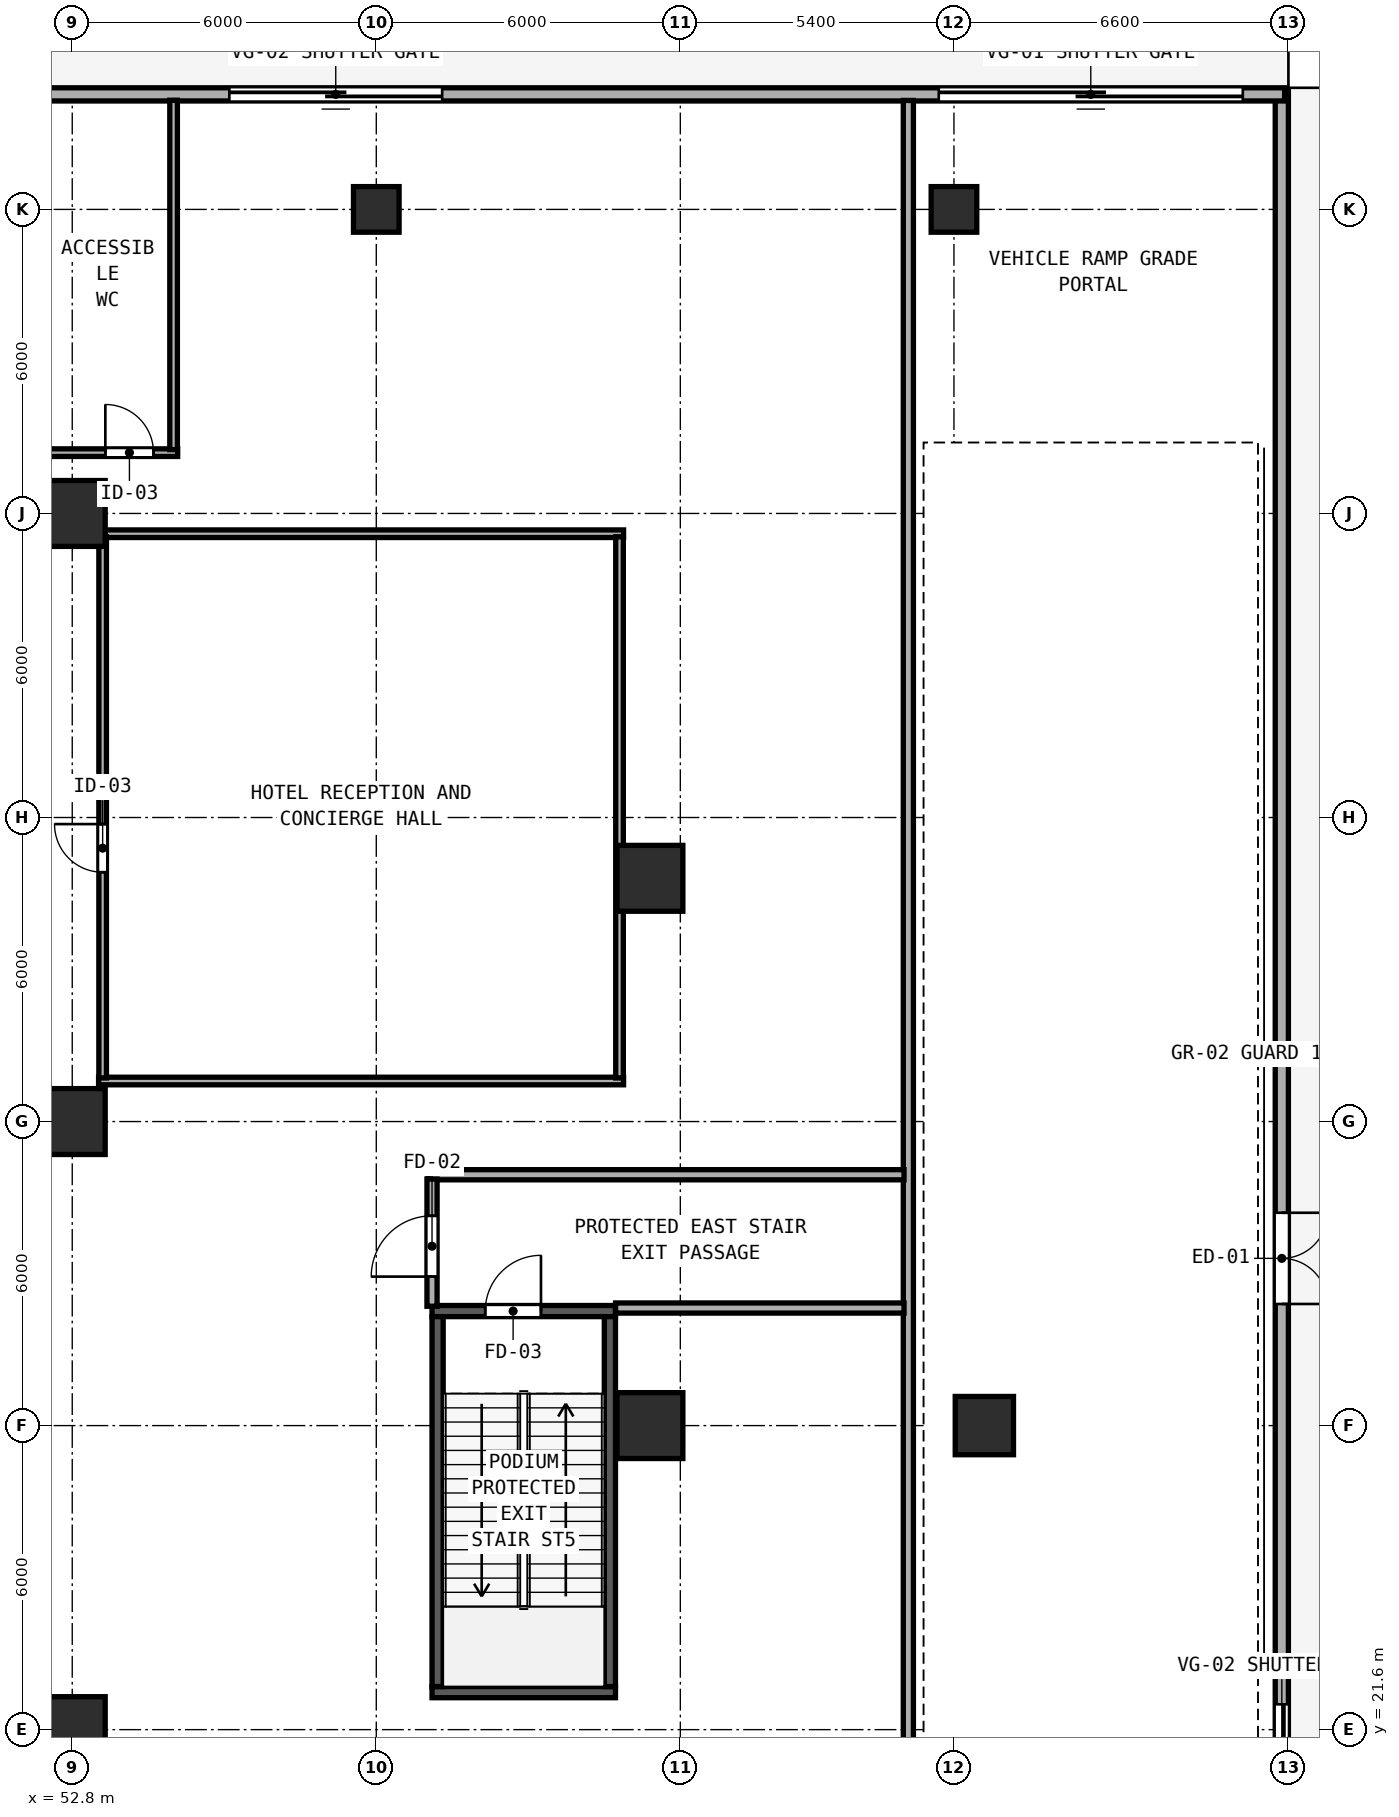
"""IFC4 building model, lengths in metres.
Left out: names, types, materials, properties, quantities, classifications, styles, units other than length and angle.
Written with IfcOpenShell. Run it as: python <this file> out.ifc"""

import sys

from ifc_helpers import new_model, si_unit, direction, frame, frame_2d, origin, origin_2d, place, context, subcontext, project, spatial, rectangle, hollow_rectangle, extrude, element, fill, save


model = new_model("IFC4")
c1 = context("Model", 3, precision=1e-05, world=origin(), true_north=direction((0.0, 1.0)))
c2 = subcontext(c1, "Body", "Model", "MODEL_VIEW")
j1 = project(units=[si_unit("LENGTHUNIT", "METRE"), si_unit("PLANEANGLEUNIT", "RADIAN")], contexts=[c1])
p1 = place(None, origin())
s1 = spatial("IfcSite", under=j1, at=p1, CompositionType="ELEMENT")
p2 = place(p1, origin())
s2 = spatial("IfcBuilding", under=s1, at=p2, CompositionType="ELEMENT")
p3 = place(p2, origin())
s3 = spatial("IfcBuildingStorey", under=s2, at=p3, CompositionType="ELEMENT", Elevation=0.0)
p4 = place(p3, frame((59.9, 29.86, 0.0), z_axis=(0.0, 0.0, 1.0), x_axis=(1.0, 0.0, 0.0)))
e1 = element("IfcWall", 1, at=p4, inside=s3, PredefinedType="SHEAR", context=c2, shape_type="SweptSolid", body=[
    extrude(rectangle(XDim=3.62, YDim=0.22, at=frame_2d((1.81, 0.0))), origin(), (0.0, 0.0, 1.0), 5.16),
])
p5 = place(p4, frame((1.05, 0.0, 0.0)))
e2 = element("IfcOpeningElement", 2, at=p5, cuts=e1, PredefinedType="OPENING", context=c2, shape_type="SweptSolid", body=[
    extrude(rectangle(XDim=1.1, YDim=2.15, at=frame_2d((0.55, 1.075))), frame((0.0, 0.12, 0.0), z_axis=(0.0, -1.0, 0.0), x_axis=(1.0, 0.0, 0.0)), (0.0, 0.0, 1.0), 0.24),
])
p6 = place(p3, frame((59.9, 22.34, 0.0), z_axis=(0.0, 0.0, 1.0), x_axis=(1.0, 0.0, 0.0)))
e3 = element("IfcWall", 3, at=p6, inside=s3, PredefinedType="SHEAR", context=c2, shape_type="SweptSolid", body=[
    extrude(rectangle(XDim=3.62, YDim=0.22, at=frame_2d((1.81, 0.0))), origin(), (0.0, 0.0, 1.0), 5.16),
])
for number, where, z_axis, x_axis in (
    (4, (60.01, 22.45, 0.0), (0.0, 0.0, 1.0), (0.0, 1.0, 0.0)),
    (5, (63.41, 22.45, 0.0), (0.0, 0.0, 1.0), (0.0, 1.0, 0.0)),
):
    element("IfcWall", number, at=place(p3, frame(where, z_axis=z_axis, x_axis=x_axis)), inside=s3, PredefinedType="SHEAR", context=c2, shape_type="SweptSolid", body=[
        extrude(rectangle(XDim=7.3, YDim=0.22, at=frame_2d((3.65, 0.0))), origin(), (0.0, 0.0, 1.0), 5.16),
    ])
for number, where, z_axis, x_axis in (
    (6, (52.8, 21.6, 0.0), (0.0, 0.0, 1.0), (1.0, 0.0, 0.0)),
    (7, (52.8, 33.6, 0.0), (0.0, 0.0, 1.0), (1.0, 0.0, 0.0)),
    (8, (52.8, 45.6, 0.0), (0.0, 0.0, 1.0), (1.0, 0.0, 0.0)),
    (9, (64.2, 27.6, 0.0), (0.0, 0.0, 1.0), (1.0, 0.0, 0.0)),
    (10, (64.2, 38.4, 0.0), (0.0, 0.0, 1.0), (1.0, 0.0, 0.0)),
):
    element("IfcColumn", number, at=place(p3, frame(where, z_axis=z_axis, x_axis=x_axis)), inside=s3, PredefinedType="COLUMN", context=c2, shape_type="SweptSolid", body=[
        extrude(hollow_rectangle(XDim=1.3, YDim=1.3, WallThickness=0.048, at=origin_2d()), origin(), (0.0, 0.0, 1.0), 5.4),
    ])
p7 = place(p3, frame((70.8, 27.6, 0.0), z_axis=(0.0, 0.0, 1.0), x_axis=(1.0, 0.0, 0.0)))
e11 = element("IfcColumn", 11, at=p7, inside=s3, PredefinedType="COLUMN", context=c2, shape_type="SweptSolid", body=[
    extrude(hollow_rectangle(XDim=1.15, YDim=1.15, WallThickness=0.042, at=origin_2d()), origin(), (0.0, 0.0, 1.0), 5.4),
])
for number, where, z_axis, x_axis in (
    (12, (58.8, 51.6, 0.0), (0.0, 0.0, 1.0), (1.0, 0.0, 0.0)),
    (13, (70.2, 51.6, 0.0), (0.0, 0.0, 1.0), (1.0, 0.0, 0.0)),
):
    element("IfcColumn", number, at=place(p3, frame(where, z_axis=z_axis, x_axis=x_axis)), inside=s3, PredefinedType="COLUMN", context=c2, shape_type="SweptSolid", body=[
        extrude(rectangle(XDim=0.9, YDim=0.9, at=origin_2d()), origin(), (0.0, 0.0, 1.0), 5.4),
    ])
p8 = place(p3, frame((76.67, 2.399, 0.0), z_axis=(0.0, 0.0, 1.0), x_axis=(0.0, 1.0, 0.0)))
e14 = element("IfcWall", 14, at=p8, inside=s3, PredefinedType="SOLIDWALL", context=c2, shape_type="SweptSolid", body=[
    extrude(rectangle(XDim=51.526, YDim=0.26, at=frame_2d((25.763, 0.0))), origin(), (0.0, 0.0, 1.0), 5.16),
])
p9 = place(p8, frame((29.401, 0.0, 0.0), z_axis=(0.0, 0.0, 1.0), x_axis=(-1.0, 0.0, 0.0)))
e15 = element("IfcOpeningElement", 15, at=p9, cuts=e14, PredefinedType="OPENING", context=c2, shape_type="SweptSolid", body=[
    extrude(rectangle(XDim=1.8, YDim=2.35, at=frame_2d((0.9, 1.175))), frame((0.0, 0.14, 0.0), z_axis=(0.0, -1.0, 0.0), x_axis=(1.0, 0.0, 0.0)), (0.0, 0.0, 1.0), 0.28),
])
p10 = place(p8, frame((19.701, 0.0, 0.0), z_axis=(0.0, 0.0, 1.0), x_axis=(-1.0, 0.0, 0.0)))
e16 = element("IfcOpeningElement", 16, at=p10, cuts=e14, PredefinedType="OPENING", context=c2, shape_type="SweptSolid", body=[
    extrude(rectangle(XDim=4.2, YDim=3.3, at=frame_2d((2.1, 1.65))), frame((0.0, 0.14, 0.0), z_axis=(0.0, -1.0, 0.0), x_axis=(1.0, 0.0, 0.0)), (0.0, 0.0, 1.0), 0.28),
])
p11 = place(p3, frame((76.725, 53.87, 0.0), z_axis=(0.0, 0.0, 1.0), x_axis=(-1.0, 0.0, 0.0)))
e17 = element("IfcWall", 17, at=p11, inside=s3, PredefinedType="SOLIDWALL", context=c2, shape_type="SweptSolid", body=[
    extrude(rectangle(XDim=76.65, YDim=0.26, at=frame_2d((38.325, 0.0))), origin(), (0.0, 0.0, 1.0), 5.16),
])
p12 = place(p11, frame((42.425, 0.0, 0.0), z_axis=(0.0, 0.0, 1.0), x_axis=(-1.0, 0.0, 0.0)))
e18 = element("IfcOpeningElement", 18, at=p12, cuts=e17, PredefinedType="OPENING", context=c2, shape_type="SweptSolid", body=[
    extrude(rectangle(XDim=1.8, YDim=2.35, at=frame_2d((0.9, 1.175))), frame((0.0, 0.14, 0.0), z_axis=(0.0, -1.0, 0.0), x_axis=(1.0, 0.0, 0.0)), (0.0, 0.0, 1.0), 0.28),
])
p13 = place(p11, frame((36.025, 0.0, 0.0), z_axis=(0.0, 0.0, 1.0), x_axis=(-1.0, 0.0, 0.0)))
e19 = element("IfcOpeningElement", 19, at=p13, cuts=e17, PredefinedType="OPENING", context=c2, shape_type="SweptSolid", body=[
    extrude(rectangle(XDim=1.8, YDim=2.35, at=frame_2d((0.9, 1.175))), frame((0.0, 0.14, 0.0), z_axis=(0.0, -1.0, 0.0), x_axis=(1.0, 0.0, 0.0)), (0.0, 0.0, 1.0), 0.28),
])
p14 = place(p11, frame((49.475, 0.0, 0.0), z_axis=(0.0, 0.0, 1.0), x_axis=(-1.0, 0.0, 0.0)))
e20 = element("IfcOpeningElement", 20, at=p14, cuts=e17, PredefinedType="OPENING", context=c2, shape_type="SweptSolid", body=[
    extrude(rectangle(XDim=1.1, YDim=2.2, at=frame_2d((0.55, 1.1))), frame((0.0, 0.14, 0.0), z_axis=(0.0, -1.0, 0.0), x_axis=(1.0, 0.0, 0.0)), (0.0, 0.0, 1.0), 0.28),
])
p15 = place(p11, frame((6.825, 0.0, 0.0), z_axis=(0.0, 0.0, 1.0), x_axis=(-1.0, 0.0, 0.0)))
e21 = element("IfcOpeningElement", 21, at=p15, cuts=e17, PredefinedType="OPENING", context=c2, shape_type="SweptSolid", body=[
    extrude(rectangle(XDim=6.0, YDim=3.4, at=frame_2d((3.0, 1.7))), frame((0.0, 0.14, 0.0), z_axis=(0.0, -1.0, 0.0), x_axis=(1.0, 0.0, 0.0)), (0.0, 0.0, 1.0), 0.28),
])
p16 = place(p11, frame((72.225, 0.0, 0.0), z_axis=(0.0, 0.0, 1.0), x_axis=(-1.0, 0.0, 0.0)))
e22 = element("IfcOpeningElement", 22, at=p16, cuts=e17, PredefinedType="OPENING", context=c2, shape_type="SweptSolid", body=[
    extrude(rectangle(XDim=4.2, YDim=3.3, at=frame_2d((2.1, 1.65))), frame((0.0, 0.14, 0.0), z_axis=(0.0, -1.0, 0.0), x_axis=(1.0, 0.0, 0.0)), (0.0, 0.0, 1.0), 0.28),
])
p17 = place(p11, frame((20.825, 0.0, 0.0), z_axis=(0.0, 0.0, 1.0), x_axis=(-1.0, 0.0, 0.0)))
e23 = element("IfcOpeningElement", 23, at=p17, cuts=e17, PredefinedType="OPENING", context=c2, shape_type="SweptSolid", body=[
    extrude(rectangle(XDim=4.2, YDim=3.3, at=frame_2d((2.1, 1.65))), frame((0.0, 0.14, 0.0), z_axis=(0.0, -1.0, 0.0), x_axis=(1.0, 0.0, 0.0)), (0.0, 0.0, 1.0), 0.28),
])
p18 = place(p3, frame((69.3, 10.3, 0.0), z_axis=(0.0, 0.0, 1.0), x_axis=(0.0, 1.0, 0.0)))
e24 = element("IfcWall", 24, at=p18, inside=s3, PredefinedType="SOLIDWALL", context=c2, shape_type="SweptSolid", body=[
    extrude(rectangle(XDim=43.45, YDim=0.2, at=frame_2d((21.725, 0.0))), origin(), (0.0, 0.0, 1.0), 5.16),
])
p19 = place(p3, frame((59.82, 32.55, 0.0), z_axis=(0.0, 0.0, 1.0), x_axis=(1.0, 0.0, 0.0)))
e25 = element("IfcWall", 25, at=p19, inside=s3, PredefinedType="SOLIDWALL", context=c2, shape_type="SweptSolid", body=[
    extrude(rectangle(XDim=9.395, YDim=0.2, at=frame_2d((4.698, 0.0))), origin(), (0.0, 0.0, 1.0), 5.16),
])
p20 = place(p3, frame((59.9, 29.955, 0.0), z_axis=(0.0, 0.0, 1.0), x_axis=(0.0, 1.0, 0.0)))
e26 = element("IfcWall", 26, at=p20, inside=s3, PredefinedType="SOLIDWALL", context=c2, shape_type="SweptSolid", body=[
    extrude(rectangle(XDim=2.51, YDim=0.2, at=frame_2d((1.255, 0.0))), origin(), (0.0, 0.0, 1.0), 5.16),
])
p21 = place(p20, frame((0.585, 0.0, 0.0)))
e27 = element("IfcOpeningElement", 27, at=p21, cuts=e26, PredefinedType="OPENING", context=c2, shape_type="SweptSolid", body=[
    extrude(rectangle(XDim=1.2, YDim=2.15, at=frame_2d((0.6, 1.075))), frame((0.0, 0.11, 0.0), z_axis=(0.0, -1.0, 0.0), x_axis=(1.0, 0.0, 0.0)), (0.0, 0.0, 1.0), 0.22),
])
p22 = place(p3, frame((63.522, 29.92, 0.0), z_axis=(0.0, 0.0, 1.0), x_axis=(1.0, 0.0, 0.0)))
e28 = element("IfcWall", 28, at=p22, inside=s3, PredefinedType="SOLIDWALL", context=c2, shape_type="SweptSolid", body=[
    extrude(rectangle(XDim=5.693, YDim=0.2, at=frame_2d((2.847, 0.0))), origin(), (0.0, 0.0, 1.0), 5.16),
])
p23 = place(p3, frame((52.132, 46.8, 0.0), z_axis=(0.0, 0.0, 1.0), x_axis=(1.0, 0.0, 0.0)))
e29 = element("IfcWall", 29, at=p23, inside=s3, PredefinedType="PARTITIONING", context=c2, shape_type="SweptSolid", body=[
    extrude(rectangle(XDim=2.748, YDim=0.15, at=frame_2d((1.374, 0.0))), origin(), (0.0, 0.0, 1.0), 5.16),
])
p24 = place(p23, frame((1.321, 0.0, 0.0)))
e30 = element("IfcOpeningElement", 30, at=p24, cuts=e29, PredefinedType="OPENING", context=c2, shape_type="SweptSolid", body=[
    extrude(rectangle(XDim=0.95, YDim=2.12, at=frame_2d((0.475, 1.06))), frame((0.0, 0.085, 0.0), z_axis=(0.0, -1.0, 0.0), x_axis=(1.0, 0.0, 0.0)), (0.0, 0.0, 1.0), 0.17),
])
p25 = place(p3, frame((54.8, 46.86, 0.0), z_axis=(0.0, 0.0, 1.0), x_axis=(0.0, 1.0, 0.0)))
e31 = element("IfcWall", 31, at=p25, inside=s3, PredefinedType="PARTITIONING", context=c2, shape_type="SweptSolid", body=[
    extrude(rectangle(XDim=6.895, YDim=0.15, at=frame_2d((3.447, 0.0))), origin(), (0.0, 0.0, 1.0), 5.16),
])
for number, where, z_axis, x_axis in (
    (32, (53.32, 45.2, 0.0), (0.0, 0.0, 1.0), (1.0, 0.0, 0.0)),
    (33, (53.32, 34.4, 0.0), (0.0, 0.0, 1.0), (1.0, 0.0, 0.0)),
):
    element("IfcWall", number, at=place(p3, frame(where, z_axis=z_axis, x_axis=x_axis)), inside=s3, PredefinedType="PARTITIONING", context=c2, shape_type="SweptSolid", body=[
        extrude(rectangle(XDim=10.36, YDim=0.15, at=frame_2d((5.18, 0.0))), origin(), (0.0, 0.0, 1.0), 5.16),
    ])
p26 = place(p3, frame((53.4, 34.46, 0.0), z_axis=(0.0, 0.0, 1.0), x_axis=(0.0, 1.0, 0.0)))
e34 = element("IfcWall", 34, at=p26, inside=s3, PredefinedType="PARTITIONING", context=c2, shape_type="SweptSolid", body=[
    extrude(rectangle(XDim=10.68, YDim=0.15, at=frame_2d((5.34, 0.0))), origin(), (0.0, 0.0, 1.0), 5.16),
])
p27 = place(p26, frame((4.06, 0.0, 0.0)))
e35 = element("IfcOpeningElement", 35, at=p27, cuts=e34, PredefinedType="OPENING", context=c2, shape_type="SweptSolid", body=[
    extrude(rectangle(XDim=0.95, YDim=2.12, at=frame_2d((0.475, 1.06))), frame((0.0, 0.085, 0.0), z_axis=(0.0, -1.0, 0.0), x_axis=(1.0, 0.0, 0.0)), (0.0, 0.0, 1.0), 0.17),
])
p28 = place(p3, frame((63.6, 34.46, 0.0), z_axis=(0.0, 0.0, 1.0), x_axis=(0.0, 1.0, 0.0)))
e36 = element("IfcWall", 36, at=p28, inside=s3, PredefinedType="PARTITIONING", context=c2, shape_type="SweptSolid", body=[
    extrude(rectangle(XDim=10.68, YDim=0.15, at=frame_2d((5.34, 0.0))), origin(), (0.0, 0.0, 1.0), 5.16),
])
p29 = place(p9, origin())
e37 = element("IfcDoor", 37, at=p29, inside=s3, OperationType="DOUBLE_DOOR_SINGLE_SWING", PredefinedType="DOOR", context=c2, shape_type="SweptSolid", body=[
    extrude(rectangle(XDim=1.8, YDim=2.35, at=frame_2d((0.9, 1.175))), frame((0.0, 0.025, 0.0), z_axis=(0.0, -1.0, 0.0), x_axis=(1.0, 0.0, 0.0)), (0.0, 0.0, 1.0), 0.05),
])
fill(e15, e37)
p30 = place(p15, origin())
e38 = element("IfcDoor", 38, at=p30, inside=s3, OperationType="SLIDING_TO_LEFT", PredefinedType="GATE", context=c2, shape_type="SweptSolid", body=[
    extrude(rectangle(XDim=6.0, YDim=3.4, at=frame_2d((3.0, 1.7))), frame((0.0, 0.025, 0.0), z_axis=(0.0, -1.0, 0.0), x_axis=(1.0, 0.0, 0.0)), (0.0, 0.0, 1.0), 0.05),
])
fill(e21, e38)
p31 = place(p10, origin())
e39 = element("IfcDoor", 39, at=p31, inside=s3, OperationType="SLIDING_TO_LEFT", PredefinedType="GATE", context=c2, shape_type="SweptSolid", body=[
    extrude(rectangle(XDim=4.2, YDim=3.3, at=frame_2d((2.1, 1.65))), frame((0.0, 0.025, 0.0), z_axis=(0.0, -1.0, 0.0), x_axis=(1.0, 0.0, 0.0)), (0.0, 0.0, 1.0), 0.05),
])
fill(e16, e39)
p32 = place(p17, origin())
e40 = element("IfcDoor", 40, at=p32, inside=s3, OperationType="SLIDING_TO_RIGHT", PredefinedType="GATE", context=c2, shape_type="SweptSolid", body=[
    extrude(rectangle(XDim=4.2, YDim=3.3, at=frame_2d((2.1, 1.65))), frame((0.0, 0.025, 0.0), z_axis=(0.0, -1.0, 0.0), x_axis=(1.0, 0.0, 0.0)), (0.0, 0.0, 1.0), 0.05),
])
fill(e23, e40)
p33 = place(p5, origin())
e41 = element("IfcDoor", 41, at=p33, inside=s3, OperationType="SINGLE_SWING_RIGHT", PredefinedType="DOOR", context=c2, shape_type="SweptSolid", body=[
    extrude(rectangle(XDim=1.1, YDim=2.15, at=frame_2d((0.55, 1.075))), frame((0.0, 0.025, 0.0), z_axis=(0.0, -1.0, 0.0), x_axis=(1.0, 0.0, 0.0)), (0.0, 0.0, 1.0), 0.05),
])
fill(e2, e41)
p34 = place(p21, origin())
e42 = element("IfcDoor", 42, at=p34, inside=s3, OperationType="SINGLE_SWING_LEFT", PredefinedType="DOOR", context=c2, shape_type="SweptSolid", body=[
    extrude(rectangle(XDim=1.2, YDim=2.15, at=frame_2d((0.6, 1.075))), frame((0.0, 0.025, 0.0), z_axis=(0.0, -1.0, 0.0), x_axis=(1.0, 0.0, 0.0)), (0.0, 0.0, 1.0), 0.05),
])
fill(e27, e42)
p35 = place(p24, origin())
e43 = element("IfcDoor", 43, at=p35, inside=s3, OperationType="SINGLE_SWING_LEFT", PredefinedType="DOOR", context=c2, shape_type="SweptSolid", body=[
    extrude(rectangle(XDim=0.95, YDim=2.12, at=frame_2d((0.475, 1.06))), frame((0.0, 0.025, 0.0), z_axis=(0.0, -1.0, 0.0), x_axis=(1.0, 0.0, 0.0)), (0.0, 0.0, 1.0), 0.05),
])
fill(e30, e43)
p36 = place(p27, origin())
e44 = element("IfcDoor", 44, at=p36, inside=s3, OperationType="SINGLE_SWING_RIGHT", PredefinedType="DOOR", context=c2, shape_type="SweptSolid", body=[
    extrude(rectangle(XDim=0.95, YDim=2.12, at=frame_2d((0.475, 1.06))), frame((0.0, 0.025, 0.0), z_axis=(0.0, -1.0, 0.0), x_axis=(1.0, 0.0, 0.0)), (0.0, 0.0, 1.0), 0.05),
])
fill(e35, e44)
save(model, sys.argv[1])
